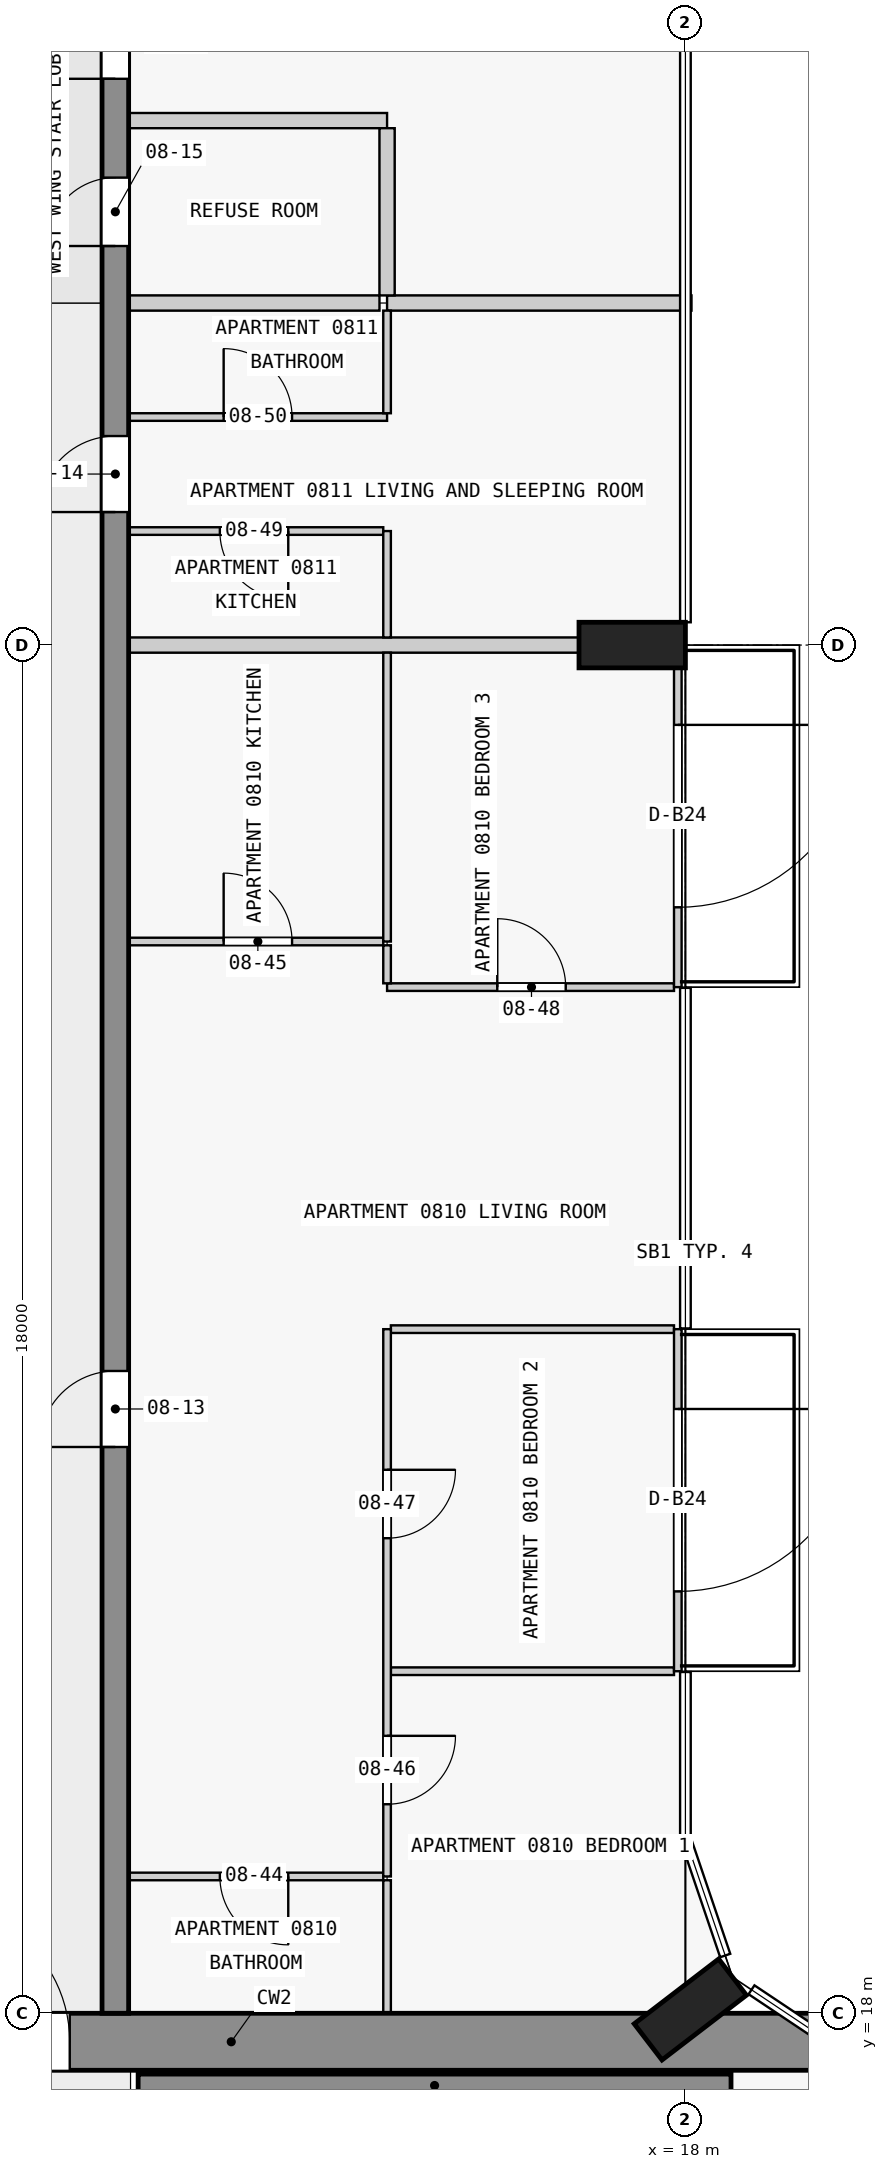
"""IFC4 building model, lengths in metres.
Left out: names, types, materials, properties, quantities, classifications, styles, units other than length and angle.
Written with IfcOpenShell. Run it as: python <this file> out.ifc"""

import sys

from ifc_helpers import new_model, si_unit, direction, frame, frame_2d, origin, origin_2d, place, context, subcontext, project, spatial, rectangle, extrude, element, fill, save


model = new_model("IFC4")
c1 = context("Model", 3, precision=1e-05, world=origin(), true_north=direction((0.0, 1.0)))
c2 = subcontext(c1, "Body", "Model", "MODEL_VIEW")
j1 = project(units=[si_unit("LENGTHUNIT", "METRE"), si_unit("PLANEANGLEUNIT", "RADIAN")], contexts=[c1])
p1 = place(None, origin())
s1 = spatial("IfcSite", under=j1, at=p1, CompositionType="ELEMENT")
p2 = place(p1, origin())
s2 = spatial("IfcBuilding", under=s1, at=p2, CompositionType="ELEMENT")
p3 = place(p2, frame((0.0, 0.0, 37.3)))
s3 = spatial("IfcBuildingStorey", under=s2, at=p3, CompositionType="ELEMENT", Elevation=37.3)
for number, where, z_axis, x_axis in (
    (1, (18.065, 18.05, 0.0), (0.0, 0.0, 1.0), (-0.609, 0.793, 0.0)),
    (2, (17.3, 36.0, 0.0), (0.0, 0.0, 1.0), (0.0, 1.0, 0.0)),
):
    element("IfcColumn", number, at=place(p3, frame(where, z_axis=z_axis, x_axis=x_axis)), inside=s3, PredefinedType="COLUMN", context=c2, shape_type="SweptSolid", body=[
        extrude(rectangle(XDim=0.6, YDim=1.4, at=origin_2d()), origin(), (0.0, 0.0, 1.0), 3.5),
    ])
p4 = place(p3, frame((1.55, 17.625, 0.0), z_axis=(0.0, 0.0, 1.0), x_axis=(1.0, 0.0, 0.0)))
e3 = element("IfcWall", 3, at=p4, inside=s3, PredefinedType="SHEAR", context=c2, shape_type="SweptSolid", body=[
    extrude(rectangle(XDim=20.95, YDim=0.75, at=frame_2d((10.475, 0.0))), origin(), (0.0, 0.0, 1.0), 3.25),
])
p5 = place(p4, frame((6.55, 0.0, 0.0)))
e4 = element("IfcOpeningElement", 4, at=p5, cuts=e3, PredefinedType="OPENING", context=c2, shape_type="SweptSolid", body=[
    extrude(rectangle(XDim=1.8, YDim=2.1, at=frame_2d((0.9, 1.05))), frame((0.0, 0.385, 0.0), z_axis=(0.0, -1.0, 0.0), x_axis=(1.0, 0.0, 0.0)), (0.0, 0.0, 1.0), 0.77),
])
p6 = place(p3, frame((10.8, 17.05, 0.0), z_axis=(0.0, 0.0, 1.0), x_axis=(1.0, 0.0, 0.0)))
e5 = element("IfcWall", 5, at=p6, inside=s3, PredefinedType="SHEAR", context=c2, shape_type="SweptSolid", body=[
    extrude(rectangle(XDim=7.8, YDim=0.3, at=frame_2d((3.9, 0.0))), origin(), (0.0, 0.0, 1.0), 3.25),
])
p7 = place(p3, frame((10.5, 18.0, 0.0), z_axis=(0.0, 0.0, 1.0), x_axis=(0.0, 1.0, 0.0)))
e6 = element("IfcWall", 6, at=p7, inside=s3, PredefinedType="SHEAR", context=c2, shape_type="SweptSolid", body=[
    extrude(rectangle(XDim=27.0, YDim=0.35, at=frame_2d((13.5, 0.0))), origin(), (0.0, 0.0, 1.0), 3.25),
])
p8 = place(p7, frame((7.45, 0.0, 0.0)))
e7 = element("IfcOpeningElement", 7, at=p8, cuts=e6, PredefinedType="OPENING", context=c2, shape_type="SweptSolid", body=[
    extrude(rectangle(XDim=1.0, YDim=2.1, at=frame_2d((0.5, 1.05))), frame((0.0, 0.185, 0.0), z_axis=(0.0, -1.0, 0.0), x_axis=(1.0, 0.0, 0.0)), (0.0, 0.0, 1.0), 0.37),
])
p9 = place(p7, frame((19.75, 0.0, 0.0)))
e8 = element("IfcOpeningElement", 8, at=p9, cuts=e6, PredefinedType="OPENING", context=c2, shape_type="SweptSolid", body=[
    extrude(rectangle(XDim=1.0, YDim=2.1, at=frame_2d((0.5, 1.05))), frame((0.0, 0.185, 0.0), z_axis=(0.0, -1.0, 0.0), x_axis=(1.0, 0.0, 0.0)), (0.0, 0.0, 1.0), 0.37),
])
p10 = place(p7, frame((23.25, 0.0, 0.0)))
e9 = element("IfcOpeningElement", 9, at=p10, cuts=e6, PredefinedType="OPENING", context=c2, shape_type="SweptSolid", body=[
    extrude(rectangle(XDim=0.9, YDim=2.1, at=frame_2d((0.45, 1.05))), frame((0.0, 0.185, 0.0), z_axis=(0.0, -1.0, 0.0), x_axis=(1.0, 0.0, 0.0)), (0.0, 0.0, 1.0), 0.37),
])
p11 = place(p7, frame((25.45, 0.0, 0.0)))
e10 = element("IfcOpeningElement", 10, at=p11, cuts=e6, PredefinedType="OPENING", context=c2, shape_type="SweptSolid", body=[
    extrude(rectangle(XDim=1.0, YDim=2.1, at=frame_2d((0.5, 1.05))), frame((0.0, 0.185, 0.0), z_axis=(0.0, -1.0, 0.0), x_axis=(1.0, 0.0, 0.0)), (0.0, 0.0, 1.0), 0.37),
])
p12 = place(p3, frame((17.9, 27.0, 0.0), z_axis=(0.0, 0.0, 1.0), x_axis=(0.0, -1.0, 0.0)))
e11 = element("IfcWall", 11, at=p12, inside=s3, PredefinedType="STANDARD", context=c2, shape_type="SweptSolid", body=[
    extrude(rectangle(XDim=4.5, YDim=0.1, at=frame_2d((2.25, 0.0))), origin(), (0.0, 0.0, 1.0), 3.25),
])
p13 = place(p12, frame((1.05, 0.0, 0.0)))
e12 = element("IfcOpeningElement", 12, at=p13, cuts=e11, PredefinedType="OPENING", context=c2, shape_type="SweptSolid", body=[
    extrude(rectangle(XDim=2.4, YDim=2.4, at=frame_2d((1.2, 1.2))), frame((0.0, 0.06, 0.0), z_axis=(0.0, -1.0, 0.0), x_axis=(1.0, 0.0, 0.0)), (0.0, 0.0, 1.0), 0.12),
])
p14 = place(p3, frame((17.9, 36.0, 0.0), z_axis=(0.0, 0.0, 1.0), x_axis=(0.0, -1.0, 0.0)))
e13 = element("IfcWall", 13, at=p14, inside=s3, PredefinedType="STANDARD", context=c2, shape_type="SweptSolid", body=[
    extrude(rectangle(XDim=4.5, YDim=0.1, at=frame_2d((2.25, 0.0))), origin(), (0.0, 0.0, 1.0), 3.25),
])
p15 = place(p14, frame((1.05, 0.0, 0.0)))
e14 = element("IfcOpeningElement", 14, at=p15, cuts=e13, PredefinedType="OPENING", context=c2, shape_type="SweptSolid", body=[
    extrude(rectangle(XDim=2.4, YDim=2.4, at=frame_2d((1.2, 1.2))), frame((0.0, 0.06, 0.0), z_axis=(0.0, -1.0, 0.0), x_axis=(1.0, 0.0, 0.0)), (0.0, 0.0, 1.0), 0.12),
])
p16 = place(p3, frame((14.025, 19.8, 0.0), z_axis=(0.0, 0.0, 1.0), x_axis=(-1.0, 0.0, 0.0)))
e15 = element("IfcWall", 15, at=p16, inside=s3, PredefinedType="PARTITIONING", context=c2, shape_type="SweptSolid", body=[
    extrude(rectangle(XDim=3.35, YDim=0.1, at=frame_2d((1.675, 0.0))), origin(), (0.0, 0.0, 1.0), 3.25),
])
p17 = place(p16, frame((1.25, 0.0, 0.0)))
e16 = element("IfcOpeningElement", 16, at=p17, cuts=e15, PredefinedType="OPENING", context=c2, shape_type="SweptSolid", body=[
    extrude(rectangle(XDim=0.9, YDim=2.1, at=frame_2d((0.45, 1.05))), frame((0.0, 0.06, 0.0), z_axis=(0.0, -1.0, 0.0), x_axis=(1.0, 0.0, 0.0)), (0.0, 0.0, 1.0), 0.12),
])
for number, where, z_axis, x_axis in (
    (17, (17.85, 22.5, 0.0), (0.0, 0.0, 1.0), (-1.0, 0.0, 0.0)),
    (18, (17.85, 27.0, 0.0), (0.0, 0.0, 1.0), (-1.0, 0.0, 0.0)),
):
    element("IfcWall", number, at=place(p3, frame(where, z_axis=z_axis, x_axis=x_axis)), inside=s3, PredefinedType="PARTITIONING", context=c2, shape_type="SweptSolid", body=[
        extrude(rectangle(XDim=3.725, YDim=0.1, at=frame_2d((1.863, 0.0))), origin(), (0.0, 0.0, 1.0), 3.25),
    ])
p18 = place(p3, frame((14.075, 31.5, 0.0), z_axis=(0.0, 0.0, 1.0), x_axis=(1.0, 0.0, 0.0)))
e19 = element("IfcWall", 19, at=p18, inside=s3, PredefinedType="PARTITIONING", context=c2, shape_type="SweptSolid", body=[
    extrude(rectangle(XDim=3.775, YDim=0.1, at=frame_2d((1.888, 0.0))), origin(), (0.0, 0.0, 1.0), 3.25),
])
p19 = place(p18, frame((1.45, 0.0, 0.0)))
e20 = element("IfcOpeningElement", 20, at=p19, cuts=e19, PredefinedType="OPENING", context=c2, shape_type="SweptSolid", body=[
    extrude(rectangle(XDim=0.9, YDim=2.1, at=frame_2d((0.45, 1.05))), frame((0.0, 0.06, 0.0), z_axis=(0.0, -1.0, 0.0), x_axis=(1.0, 0.0, 0.0)), (0.0, 0.0, 1.0), 0.12),
])
p20 = place(p3, frame((10.675, 32.1, 0.0), z_axis=(0.0, 0.0, 1.0), x_axis=(1.0, 0.0, 0.0)))
e21 = element("IfcWall", 21, at=p20, inside=s3, PredefinedType="PARTITIONING", context=c2, shape_type="SweptSolid", body=[
    extrude(rectangle(XDim=3.35, YDim=0.1, at=frame_2d((1.675, 0.0))), origin(), (0.0, 0.0, 1.0), 3.25),
])
p21 = place(p20, frame((1.25, 0.0, 0.0)))
e22 = element("IfcOpeningElement", 22, at=p21, cuts=e21, PredefinedType="OPENING", context=c2, shape_type="SweptSolid", body=[
    extrude(rectangle(XDim=0.9, YDim=2.1, at=frame_2d((0.45, 1.05))), frame((0.0, 0.06, 0.0), z_axis=(0.0, -1.0, 0.0), x_axis=(1.0, 0.0, 0.0)), (0.0, 0.0, 1.0), 0.12),
])
p22 = place(p3, frame((16.6, 36.0, 0.0), z_axis=(0.0, 0.0, 1.0), x_axis=(-1.0, 0.0, 0.0)))
e23 = element("IfcWall", 23, at=p22, inside=s3, PredefinedType="PARTITIONING", context=c2, shape_type="SweptSolid", body=[
    extrude(rectangle(XDim=5.925, YDim=0.2, at=frame_2d((2.962, 0.0))), origin(), (0.0, 0.0, 1.0), 3.25),
])
p23 = place(p3, frame((14.025, 37.5, 0.0), z_axis=(0.0, 0.0, 1.0), x_axis=(-1.0, 0.0, 0.0)))
e24 = element("IfcWall", 24, at=p23, inside=s3, PredefinedType="PARTITIONING", context=c2, shape_type="SweptSolid", body=[
    extrude(rectangle(XDim=3.35, YDim=0.1, at=frame_2d((1.675, 0.0))), origin(), (0.0, 0.0, 1.0), 3.25),
])
p24 = place(p23, frame((1.25, 0.0, 0.0)))
e25 = element("IfcOpeningElement", 25, at=p24, cuts=e24, PredefinedType="OPENING", context=c2, shape_type="SweptSolid", body=[
    extrude(rectangle(XDim=0.9, YDim=2.1, at=frame_2d((0.45, 1.05))), frame((0.0, 0.06, 0.0), z_axis=(0.0, -1.0, 0.0), x_axis=(1.0, 0.0, 0.0)), (0.0, 0.0, 1.0), 0.12),
])
p25 = place(p3, frame((10.675, 39.0, 0.0), z_axis=(0.0, 0.0, 1.0), x_axis=(1.0, 0.0, 0.0)))
e26 = element("IfcWall", 26, at=p25, inside=s3, PredefinedType="PARTITIONING", context=c2, shape_type="SweptSolid", body=[
    extrude(rectangle(XDim=3.4, YDim=0.1, at=frame_2d((1.7, 0.0))), origin(), (0.0, 0.0, 1.0), 3.25),
])
p26 = place(p25, frame((1.25, 0.0, 0.0)))
e27 = element("IfcOpeningElement", 27, at=p26, cuts=e26, PredefinedType="OPENING", context=c2, shape_type="SweptSolid", body=[
    extrude(rectangle(XDim=0.9, YDim=2.1, at=frame_2d((0.45, 1.05))), frame((0.0, 0.06, 0.0), z_axis=(0.0, -1.0, 0.0), x_axis=(1.0, 0.0, 0.0)), (0.0, 0.0, 1.0), 0.12),
])
p27 = place(p3, frame((13.975, 40.5, 0.0), z_axis=(0.0, 0.0, 1.0), x_axis=(-1.0, 0.0, 0.0)))
e28 = element("IfcWall", 28, at=p27, inside=s3, PredefinedType="PARTITIONING", context=c2, shape_type="SweptSolid", body=[
    extrude(rectangle(XDim=3.3, YDim=0.2, at=frame_2d((1.65, 0.0))), origin(), (0.0, 0.0, 1.0), 3.25),
])
p28 = place(p3, frame((14.075, 40.5, 0.0), z_axis=(0.0, 0.0, 1.0), x_axis=(1.0, 0.0, 0.0)))
e29 = element("IfcWall", 29, at=p28, inside=s3, PredefinedType="PARTITIONING", context=c2, shape_type="SweptSolid", body=[
    extrude(rectangle(XDim=4.005, YDim=0.2, at=frame_2d((2.002, 0.0))), origin(), (0.0, 0.0, 1.0), 3.25),
])
p29 = place(p3, frame((14.075, 42.9, 0.0), z_axis=(0.0, 0.0, 1.0), x_axis=(-1.0, 0.0, 0.0)))
e30 = element("IfcWall", 30, at=p29, inside=s3, PredefinedType="PARTITIONING", context=c2, shape_type="SweptSolid", body=[
    extrude(rectangle(XDim=3.4, YDim=0.2, at=frame_2d((1.7, 0.0))), origin(), (0.0, 0.0, 1.0), 3.25),
])
p30 = place(p3, frame((14.075, 27.0, 0.0), z_axis=(0.0, 0.0, 1.0), x_axis=(0.0, -1.0, 0.0)))
e31 = element("IfcWall", 31, at=p30, inside=s3, PredefinedType="PARTITIONING", context=c2, shape_type="SweptSolid", body=[
    extrude(rectangle(XDim=7.2, YDim=0.1, at=frame_2d((3.6, 0.0))), origin(), (0.0, 0.0, 1.0), 3.25),
])
p31 = place(p30, frame((5.35, 0.0, 0.0)))
e32 = element("IfcOpeningElement", 32, at=p31, cuts=e31, PredefinedType="OPENING", context=c2, shape_type="SweptSolid", body=[
    extrude(rectangle(XDim=0.9, YDim=2.1, at=frame_2d((0.45, 1.05))), frame((0.0, 0.06, 0.0), z_axis=(0.0, -1.0, 0.0), x_axis=(1.0, 0.0, 0.0)), (0.0, 0.0, 1.0), 0.12),
])
p32 = place(p30, frame((1.85, 0.0, 0.0)))
e33 = element("IfcOpeningElement", 33, at=p32, cuts=e31, PredefinedType="OPENING", context=c2, shape_type="SweptSolid", body=[
    extrude(rectangle(XDim=0.9, YDim=2.1, at=frame_2d((0.45, 1.05))), frame((0.0, 0.06, 0.0), z_axis=(0.0, -1.0, 0.0), x_axis=(1.0, 0.0, 0.0)), (0.0, 0.0, 1.0), 0.12),
])
p33 = place(p3, frame((14.075, 32.05, 0.0), z_axis=(0.0, 0.0, 1.0), x_axis=(0.0, -1.0, 0.0)))
e34 = element("IfcWall", 34, at=p33, inside=s3, PredefinedType="PARTITIONING", context=c2, shape_type="SweptSolid", body=[
    extrude(rectangle(XDim=0.5, YDim=0.1, at=frame_2d((0.25, 0.0))), origin(), (0.0, 0.0, 1.0), 3.25),
])
p34 = place(p3, frame((14.075, 18.0, 0.0), z_axis=(0.0, 0.0, 1.0), x_axis=(0.0, 1.0, 0.0)))
e35 = element("IfcWall", 35, at=p34, inside=s3, PredefinedType="PARTITIONING", context=c2, shape_type="SweptSolid", body=[
    extrude(rectangle(XDim=1.75, YDim=0.1, at=frame_2d((0.875, 0.0))), origin(), (0.0, 0.0, 1.0), 3.25),
])
p35 = place(p3, frame((14.075, 32.1, 0.0), z_axis=(0.0, 0.0, 1.0), x_axis=(0.0, 1.0, 0.0)))
e36 = element("IfcWall", 36, at=p35, inside=s3, PredefinedType="PARTITIONING", context=c2, shape_type="SweptSolid", body=[
    extrude(rectangle(XDim=3.8, YDim=0.1, at=frame_2d((1.9, 0.0))), origin(), (0.0, 0.0, 1.0), 3.25),
])
p36 = place(p3, frame((14.075, 36.1, 0.0), z_axis=(0.0, 0.0, 1.0), x_axis=(0.0, 1.0, 0.0)))
e37 = element("IfcWall", 37, at=p36, inside=s3, PredefinedType="PARTITIONING", context=c2, shape_type="SweptSolid", body=[
    extrude(rectangle(XDim=1.4, YDim=0.1, at=frame_2d((0.7, 0.0))), origin(), (0.0, 0.0, 1.0), 3.25),
])
p37 = place(p3, frame((14.075, 39.05, 0.0), z_axis=(0.0, 0.0, 1.0), x_axis=(0.0, 1.0, 0.0)))
e38 = element("IfcWall", 38, at=p37, inside=s3, PredefinedType="PARTITIONING", context=c2, shape_type="SweptSolid", body=[
    extrude(rectangle(XDim=1.35, YDim=0.1, at=frame_2d((0.675, 0.0))), origin(), (0.0, 0.0, 1.0), 3.25),
])
p38 = place(p3, frame((14.075, 40.6, 0.0), z_axis=(0.0, 0.0, 1.0), x_axis=(0.0, 1.0, 0.0)))
e39 = element("IfcWall", 39, at=p38, inside=s3, PredefinedType="PARTITIONING", context=c2, shape_type="SweptSolid", body=[
    extrude(rectangle(XDim=2.2, YDim=0.2, at=frame_2d((1.1, 0.0))), origin(), (0.0, 0.0, 1.0), 3.25),
])
p39 = place(p13, origin())
e40 = element("IfcDoor", 40, at=p39, inside=s3, OperationType="SINGLE_SWING_LEFT", PredefinedType="DOOR", context=c2, shape_type="SweptSolid", body=[
    extrude(rectangle(XDim=2.4, YDim=2.4, at=frame_2d((1.2, 1.2))), frame((0.0, 0.025, 0.0), z_axis=(0.0, -1.0, 0.0), x_axis=(1.0, 0.0, 0.0)), (0.0, 0.0, 1.0), 0.05),
])
fill(e12, e40)
p40 = place(p15, origin())
e41 = element("IfcDoor", 41, at=p40, inside=s3, OperationType="SINGLE_SWING_LEFT", PredefinedType="DOOR", context=c2, shape_type="SweptSolid", body=[
    extrude(rectangle(XDim=2.4, YDim=2.4, at=frame_2d((1.2, 1.2))), frame((0.0, 0.025, 0.0), z_axis=(0.0, -1.0, 0.0), x_axis=(1.0, 0.0, 0.0)), (0.0, 0.0, 1.0), 0.05),
])
fill(e14, e41)
p41 = place(p5, origin())
e42 = element("IfcDoor", 42, at=p41, inside=s3, OperationType="DOUBLE_DOOR_SINGLE_SWING", PredefinedType="DOOR", context=c2, shape_type="SweptSolid", body=[
    extrude(rectangle(XDim=1.8, YDim=2.1, at=frame_2d((0.9, 1.05))), frame((0.0, 0.025, 0.0), z_axis=(0.0, -1.0, 0.0), x_axis=(1.0, 0.0, 0.0)), (0.0, 0.0, 1.0), 0.05),
])
fill(e4, e42)
p42 = place(p8, origin())
e43 = element("IfcDoor", 43, at=p42, inside=s3, OperationType="SINGLE_SWING_LEFT", PredefinedType="DOOR", context=c2, shape_type="SweptSolid", body=[
    extrude(rectangle(XDim=1.0, YDim=2.1, at=frame_2d((0.5, 1.05))), frame((0.0, 0.025, 0.0), z_axis=(0.0, -1.0, 0.0), x_axis=(1.0, 0.0, 0.0)), (0.0, 0.0, 1.0), 0.05),
])
fill(e7, e43)
p43 = place(p9, origin())
e44 = element("IfcDoor", 44, at=p43, inside=s3, OperationType="SINGLE_SWING_RIGHT", PredefinedType="DOOR", context=c2, shape_type="SweptSolid", body=[
    extrude(rectangle(XDim=1.0, YDim=2.1, at=frame_2d((0.5, 1.05))), frame((0.0, 0.025, 0.0), z_axis=(0.0, -1.0, 0.0), x_axis=(1.0, 0.0, 0.0)), (0.0, 0.0, 1.0), 0.05),
])
fill(e8, e44)
p44 = place(p10, origin())
e45 = element("IfcDoor", 45, at=p44, inside=s3, OperationType="SINGLE_SWING_RIGHT", PredefinedType="DOOR", context=c2, shape_type="SweptSolid", body=[
    extrude(rectangle(XDim=0.9, YDim=2.1, at=frame_2d((0.45, 1.05))), frame((0.0, 0.025, 0.0), z_axis=(0.0, -1.0, 0.0), x_axis=(1.0, 0.0, 0.0)), (0.0, 0.0, 1.0), 0.05),
])
fill(e9, e45)
p45 = place(p11, origin())
e46 = element("IfcDoor", 46, at=p45, inside=s3, OperationType="SINGLE_SWING_RIGHT", PredefinedType="DOOR", context=c2, shape_type="SweptSolid", body=[
    extrude(rectangle(XDim=1.0, YDim=2.1, at=frame_2d((0.5, 1.05))), frame((0.0, 0.025, 0.0), z_axis=(0.0, -1.0, 0.0), x_axis=(1.0, 0.0, 0.0)), (0.0, 0.0, 1.0), 0.05),
])
fill(e10, e46)
p46 = place(p17, origin())
e47 = element("IfcDoor", 47, at=p46, inside=s3, OperationType="SINGLE_SWING_RIGHT", PredefinedType="DOOR", context=c2, shape_type="SweptSolid", body=[
    extrude(rectangle(XDim=0.9, YDim=2.1, at=frame_2d((0.45, 1.05))), frame((0.0, 0.025, 0.0), z_axis=(0.0, -1.0, 0.0), x_axis=(1.0, 0.0, 0.0)), (0.0, 0.0, 1.0), 0.05),
])
fill(e16, e47)
p47 = place(p21, origin())
e48 = element("IfcDoor", 48, at=p47, inside=s3, OperationType="SINGLE_SWING_RIGHT", PredefinedType="DOOR", context=c2, shape_type="SweptSolid", body=[
    extrude(rectangle(XDim=0.9, YDim=2.1, at=frame_2d((0.45, 1.05))), frame((0.0, 0.025, 0.0), z_axis=(0.0, -1.0, 0.0), x_axis=(1.0, 0.0, 0.0)), (0.0, 0.0, 1.0), 0.05),
])
fill(e22, e48)
p48 = place(p31, origin())
e49 = element("IfcDoor", 49, at=p48, inside=s3, OperationType="SINGLE_SWING_RIGHT", PredefinedType="DOOR", context=c2, shape_type="SweptSolid", body=[
    extrude(rectangle(XDim=0.9, YDim=2.1, at=frame_2d((0.45, 1.05))), frame((0.0, 0.025, 0.0), z_axis=(0.0, -1.0, 0.0), x_axis=(1.0, 0.0, 0.0)), (0.0, 0.0, 1.0), 0.05),
])
fill(e32, e49)
p49 = place(p32, origin())
e50 = element("IfcDoor", 50, at=p49, inside=s3, OperationType="SINGLE_SWING_LEFT", PredefinedType="DOOR", context=c2, shape_type="SweptSolid", body=[
    extrude(rectangle(XDim=0.9, YDim=2.1, at=frame_2d((0.45, 1.05))), frame((0.0, 0.025, 0.0), z_axis=(0.0, -1.0, 0.0), x_axis=(1.0, 0.0, 0.0)), (0.0, 0.0, 1.0), 0.05),
])
fill(e33, e50)
p50 = place(p19, origin())
e51 = element("IfcDoor", 51, at=p50, inside=s3, OperationType="SINGLE_SWING_RIGHT", PredefinedType="DOOR", context=c2, shape_type="SweptSolid", body=[
    extrude(rectangle(XDim=0.9, YDim=2.1, at=frame_2d((0.45, 1.05))), frame((0.0, 0.025, 0.0), z_axis=(0.0, -1.0, 0.0), x_axis=(1.0, 0.0, 0.0)), (0.0, 0.0, 1.0), 0.05),
])
fill(e20, e51)
p51 = place(p24, origin())
e52 = element("IfcDoor", 52, at=p51, inside=s3, OperationType="SINGLE_SWING_RIGHT", PredefinedType="DOOR", context=c2, shape_type="SweptSolid", body=[
    extrude(rectangle(XDim=0.9, YDim=2.1, at=frame_2d((0.45, 1.05))), frame((0.0, 0.025, 0.0), z_axis=(0.0, -1.0, 0.0), x_axis=(1.0, 0.0, 0.0)), (0.0, 0.0, 1.0), 0.05),
])
fill(e25, e52)
p52 = place(p26, origin())
e53 = element("IfcDoor", 53, at=p52, inside=s3, OperationType="SINGLE_SWING_RIGHT", PredefinedType="DOOR", context=c2, shape_type="SweptSolid", body=[
    extrude(rectangle(XDim=0.9, YDim=2.1, at=frame_2d((0.45, 1.05))), frame((0.0, 0.025, 0.0), z_axis=(0.0, -1.0, 0.0), x_axis=(1.0, 0.0, 0.0)), (0.0, 0.0, 1.0), 0.05),
])
fill(e27, e53)
save(model, sys.argv[1])
